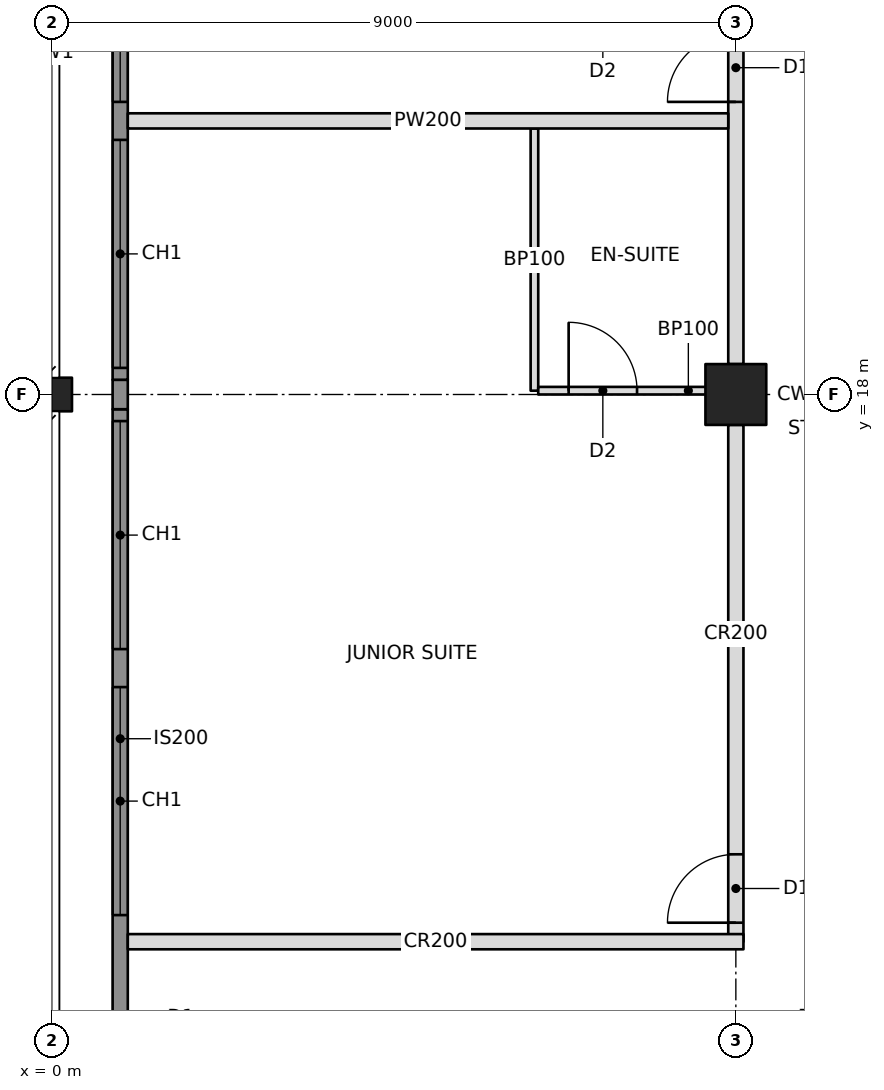
"""IFC4 building model, lengths in metres.
Left out: names, types, materials, properties, quantities, classifications, styles, units other than length and angle.
Written with IfcOpenShell. Run it as: python <this file> out.ifc"""

import sys

from ifc_helpers import new_model, si_unit, direction, frame, frame_2d, origin, origin_2d, place, context, subcontext, project, spatial, rectangle, hollow_rectangle, i_section, extrude, element, fill, save


model = new_model("IFC4")
c1 = context("Model", 3, precision=1e-05, world=origin(), true_north=direction((0.0, 1.0)))
c2 = subcontext(c1, "Body", "Model", "MODEL_VIEW")
j1 = project(units=[si_unit("LENGTHUNIT", "METRE"), si_unit("PLANEANGLEUNIT", "RADIAN")], contexts=[c1])
p1 = place(None, origin())
s1 = spatial("IfcSite", under=j1, at=p1, CompositionType="ELEMENT")
p2 = place(p1, origin())
s2 = spatial("IfcBuilding", under=s1, at=p2, CompositionType="ELEMENT")
p3 = place(p2, frame((0.0, 0.0, 148.6)))
s3 = spatial("IfcBuildingStorey", under=s2, at=p3, CompositionType="ELEMENT", Elevation=148.6)
p4 = place(p3, frame((0.0, 18.0, 0.0), z_axis=(0.0, 0.0, 1.0), x_axis=(0.0, 1.0, 0.0)))
e1 = element("IfcColumn", 1, at=p4, inside=s3, PredefinedType="COLUMN", context=c2, shape_type="SweptSolid", body=[
    extrude(i_section(OverallWidth=0.442, OverallDepth=0.531, WebThickness=0.066, FlangeThickness=0.106, at=origin_2d()), origin(), (0.0, 0.0, 1.0), 3.4),
])
p5 = place(p3, frame((9.0, 18.0, 0.0), z_axis=(0.0, 0.0, 1.0), x_axis=(1.0, 0.0, 0.0)))
e2 = element("IfcColumn", 2, at=p5, inside=s3, PredefinedType="COLUMN", context=c2, shape_type="SweptSolid", body=[
    extrude(hollow_rectangle(XDim=0.8, YDim=0.8, WallThickness=0.07, at=origin_2d()), origin(), (0.0, 0.0, 1.0), 3.4),
])
p6 = place(p3, frame((9.0, 10.8, 0.0), z_axis=(0.0, 0.0, 1.0), x_axis=(0.0, 1.0, 0.0)))
e3 = element("IfcWall", 3, at=p6, inside=s3, PredefinedType="PARTITIONING", context=c2, shape_type="SweptSolid", body=[
    extrude(rectangle(XDim=6.8, YDim=0.2, at=frame_2d((3.4, 0.0))), origin(), (0.0, 0.0, 1.0), 2.405),
])
p7 = place(p6, frame((0.25, 0.0, 0.0)))
e4 = element("IfcOpeningElement", 4, at=p7, cuts=e3, PredefinedType="OPENING", context=c2, shape_type="SweptSolid", body=[
    extrude(rectangle(XDim=0.9, YDim=2.1, at=frame_2d((0.45, 1.05))), frame((0.0, 0.11, 0.0), z_axis=(0.0, -1.0, 0.0), x_axis=(1.0, 0.0, 0.0)), (0.0, 0.0, 1.0), 0.22),
])
p8 = place(p3, frame((9.0, 18.4, 0.0), z_axis=(0.0, 0.0, 1.0), x_axis=(0.0, 1.0, 0.0)))
e5 = element("IfcWall", 5, at=p8, inside=s3, PredefinedType="PARTITIONING", context=c2, shape_type="SweptSolid", body=[
    extrude(rectangle(XDim=6.8, YDim=0.2, at=frame_2d((3.4, 0.0))), origin(), (0.0, 0.0, 1.0), 2.405),
])
p9 = place(p8, frame((3.45, 0.0, 0.0)))
e6 = element("IfcOpeningElement", 6, at=p9, cuts=e5, PredefinedType="OPENING", context=c2, shape_type="SweptSolid", body=[
    extrude(rectangle(XDim=0.9, YDim=2.1, at=frame_2d((0.45, 1.05))), frame((0.0, 0.11, 0.0), z_axis=(0.0, -1.0, 0.0), x_axis=(1.0, 0.0, 0.0)), (0.0, 0.0, 1.0), 0.22),
])
p10 = place(p3, frame((1.0, 10.8, 0.0), z_axis=(0.0, 0.0, 1.0), x_axis=(1.0, 0.0, 0.0)))
e7 = element("IfcWall", 7, at=p10, inside=s3, PredefinedType="PARTITIONING", context=c2, shape_type="SweptSolid", body=[
    extrude(rectangle(XDim=8.1, YDim=0.2, at=frame_2d((4.05, 0.0))), origin(), (0.0, 0.0, 1.0), 2.404),
])
p11 = place(p3, frame((8.9, 21.6, 0.0), z_axis=(0.0, 0.0, 1.0), x_axis=(-1.0, 0.0, 0.0)))
e8 = element("IfcWall", 8, at=p11, inside=s3, PredefinedType="PARTITIONING", context=c2, shape_type="SweptSolid", body=[
    extrude(rectangle(XDim=7.9, YDim=0.2, at=frame_2d((3.95, 0.0))), origin(), (0.0, 0.0, 1.0), 2.404),
])
p12 = place(p3, frame((6.35, 18.05, 0.0), z_axis=(0.0, 0.0, 1.0), x_axis=(0.0, 1.0, 0.0)))
e9 = element("IfcWall", 9, at=p12, inside=s3, PredefinedType="PARTITIONING", context=c2, shape_type="SweptSolid", body=[
    extrude(rectangle(XDim=3.45, YDim=0.1, at=frame_2d((1.725, 0.0))), origin(), (0.0, 0.0, 1.0), 2.404),
])
p13 = place(p3, frame((8.9, 18.05, 0.0), z_axis=(0.0, 0.0, 1.0), x_axis=(-1.0, 0.0, 0.0)))
e10 = element("IfcWall", 10, at=p13, inside=s3, PredefinedType="PARTITIONING", context=c2, shape_type="SweptSolid", body=[
    extrude(rectangle(XDim=2.5, YDim=0.1, at=frame_2d((1.25, 0.0))), origin(), (0.0, 0.0, 1.0), 2.405),
])
p14 = place(p13, frame((1.2, 0.0, 0.0)))
e11 = element("IfcOpeningElement", 11, at=p14, cuts=e10, PredefinedType="OPENING", context=c2, shape_type="SweptSolid", body=[
    extrude(rectangle(XDim=0.9, YDim=2.1, at=frame_2d((0.45, 1.05))), frame((0.0, 0.06, 0.0), z_axis=(0.0, -1.0, 0.0), x_axis=(1.0, 0.0, 0.0)), (0.0, 0.0, 1.0), 0.12),
])
p15 = place(p3, frame((0.9, 9.135, 0.0), z_axis=(0.0, 0.0, 1.0), x_axis=(0.0, 1.0, 0.0)))
e12 = element("IfcWall", 12, at=p15, inside=s3, PredefinedType="SOLIDWALL", context=c2, shape_type="SweptSolid", body=[
    extrude(rectangle(XDim=8.671, YDim=0.2, at=frame_2d((4.335, 0.0))), origin(), (0.0, 0.0, 1.0), 3.2),
])
p16 = place(p15, frame((2.015, 0.0, 0.6)))
e13 = element("IfcOpeningElement", 13, at=p16, cuts=e12, PredefinedType="OPENING", context=c2, shape_type="SweptSolid", body=[
    extrude(rectangle(XDim=3.0, YDim=2.2, at=frame_2d((1.5, 1.1))), frame((0.0, 0.11, 0.0), z_axis=(0.0, -1.0, 0.0), x_axis=(1.0, 0.0, 0.0)), (0.0, 0.0, 1.0), 0.22),
])
p17 = place(p15, frame((5.515, 0.0, 0.6)))
e14 = element("IfcOpeningElement", 14, at=p17, cuts=e12, PredefinedType="OPENING", context=c2, shape_type="SweptSolid", body=[
    extrude(rectangle(XDim=3.0, YDim=2.2, at=frame_2d((1.5, 1.1))), frame((0.0, 0.11, 0.0), z_axis=(0.0, -1.0, 0.0), x_axis=(1.0, 0.0, 0.0)), (0.0, 0.0, 1.0), 0.22),
])
p18 = place(p3, frame((0.9, 17.806, 0.0), z_axis=(0.0, 0.0, 1.0), x_axis=(0.0, 1.0, 0.0)))
e15 = element("IfcWall", 15, at=p18, inside=s3, PredefinedType="SOLIDWALL", context=c2, shape_type="SweptSolid", body=[
    extrude(rectangle(XDim=0.388, YDim=0.2, at=frame_2d((0.194, 0.0))), origin(), (0.0, 0.0, 1.0), 2.404),
])
p19 = place(p3, frame((0.9, 18.194, 0.0), z_axis=(0.0, 0.0, 1.0), x_axis=(0.0, 1.0, 0.0)))
e16 = element("IfcWall", 16, at=p19, inside=s3, PredefinedType="SOLIDWALL", context=c2, shape_type="SweptSolid", body=[
    extrude(rectangle(XDim=8.671, YDim=0.2, at=frame_2d((4.335, 0.0))), origin(), (0.0, 0.0, 1.0), 3.2),
])
p20 = place(p19, frame((0.156, 0.0, 0.6)))
e17 = element("IfcOpeningElement", 17, at=p20, cuts=e16, PredefinedType="OPENING", context=c2, shape_type="SweptSolid", body=[
    extrude(rectangle(XDim=3.0, YDim=2.2, at=frame_2d((1.5, 1.1))), frame((0.0, 0.11, 0.0), z_axis=(0.0, -1.0, 0.0), x_axis=(1.0, 0.0, 0.0)), (0.0, 0.0, 1.0), 0.22),
])
p21 = place(p19, frame((3.656, 0.0, 0.6)))
e18 = element("IfcOpeningElement", 18, at=p21, cuts=e16, PredefinedType="OPENING", context=c2, shape_type="SweptSolid", body=[
    extrude(rectangle(XDim=3.0, YDim=2.2, at=frame_2d((1.5, 1.1))), frame((0.0, 0.11, 0.0), z_axis=(0.0, -1.0, 0.0), x_axis=(1.0, 0.0, 0.0)), (0.0, 0.0, 1.0), 0.22),
])
p22 = place(p16, origin())
e19 = element("IfcWindow", 19, at=p22, inside=s3, PartitioningType="TRIPLE_PANEL_VERTICAL", PredefinedType="WINDOW", context=c2, shape_type="SweptSolid", body=[
    extrude(rectangle(XDim=3.0, YDim=2.2, at=frame_2d((1.5, 1.1))), frame((0.0, 0.03, 0.0), z_axis=(0.0, -1.0, 0.0), x_axis=(1.0, 0.0, 0.0)), (0.0, 0.0, 1.0), 0.06),
])
fill(e13, e19)
p23 = place(p17, origin())
e20 = element("IfcWindow", 20, at=p23, inside=s3, PartitioningType="TRIPLE_PANEL_VERTICAL", PredefinedType="WINDOW", context=c2, shape_type="SweptSolid", body=[
    extrude(rectangle(XDim=3.0, YDim=2.2, at=frame_2d((1.5, 1.1))), frame((0.0, 0.03, 0.0), z_axis=(0.0, -1.0, 0.0), x_axis=(1.0, 0.0, 0.0)), (0.0, 0.0, 1.0), 0.06),
])
fill(e14, e20)
p24 = place(p20, origin())
e21 = element("IfcWindow", 21, at=p24, inside=s3, PartitioningType="TRIPLE_PANEL_VERTICAL", PredefinedType="WINDOW", context=c2, shape_type="SweptSolid", body=[
    extrude(rectangle(XDim=3.0, YDim=2.2, at=frame_2d((1.5, 1.1))), frame((0.0, 0.03, 0.0), z_axis=(0.0, -1.0, 0.0), x_axis=(1.0, 0.0, 0.0)), (0.0, 0.0, 1.0), 0.06),
])
fill(e17, e21)
p25 = place(p21, origin())
e22 = element("IfcWindow", 22, at=p25, inside=s3, PartitioningType="TRIPLE_PANEL_VERTICAL", PredefinedType="WINDOW", context=c2, shape_type="SweptSolid", body=[
    extrude(rectangle(XDim=3.0, YDim=2.2, at=frame_2d((1.5, 1.1))), frame((0.0, 0.03, 0.0), z_axis=(0.0, -1.0, 0.0), x_axis=(1.0, 0.0, 0.0)), (0.0, 0.0, 1.0), 0.06),
])
fill(e18, e22)
p26 = place(p14, frame((0.9, 0.0, 0.0), z_axis=(0.0, 0.0, 1.0), x_axis=(-1.0, 0.0, 0.0)))
e23 = element("IfcDoor", 23, at=p26, inside=s3, OperationType="SINGLE_SWING_LEFT", PredefinedType="DOOR", context=c2, shape_type="SweptSolid", body=[
    extrude(rectangle(XDim=0.9, YDim=2.1, at=frame_2d((0.45, 1.05))), frame((0.0, 0.025, 0.0), z_axis=(0.0, -1.0, 0.0), x_axis=(1.0, 0.0, 0.0)), (0.0, 0.0, 1.0), 0.05),
])
fill(e11, e23)
p27 = place(p7, origin())
e24 = element("IfcDoor", 24, at=p27, inside=s3, OperationType="SINGLE_SWING_LEFT", PredefinedType="DOOR", context=c2, shape_type="SweptSolid", body=[
    extrude(rectangle(XDim=0.9, YDim=2.1, at=frame_2d((0.45, 1.05))), frame((0.0, 0.025, 0.0), z_axis=(0.0, -1.0, 0.0), x_axis=(1.0, 0.0, 0.0)), (0.0, 0.0, 1.0), 0.05),
])
fill(e4, e24)
p28 = place(p9, origin())
e25 = element("IfcDoor", 25, at=p28, inside=s3, OperationType="SINGLE_SWING_LEFT", PredefinedType="DOOR", context=c2, shape_type="SweptSolid", body=[
    extrude(rectangle(XDim=0.9, YDim=2.1, at=frame_2d((0.45, 1.05))), frame((0.0, 0.025, 0.0), z_axis=(0.0, -1.0, 0.0), x_axis=(1.0, 0.0, 0.0)), (0.0, 0.0, 1.0), 0.05),
])
fill(e6, e25)
save(model, sys.argv[1])
